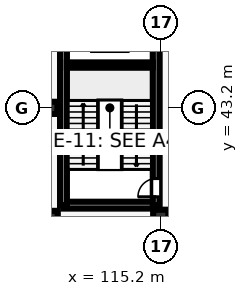
"""IFC4 building model, lengths in metres.
Left out: names, types, materials, properties, quantities, classifications, styles, units other than length and angle.
Written with IfcOpenShell. Run it as: python <this file> out.ifc"""

import sys

from ifc_helpers import new_model, si_unit, direction, frame, frame_2d, origin, origin_2d, place, context, subcontext, project, spatial, rectangle, circle, extrude, element, fill, save


model = new_model("IFC4")
c1 = context("Model", 3, precision=1e-05, world=origin(), true_north=direction((0.0, 1.0)))
c2 = subcontext(c1, "Body", "Model", "MODEL_VIEW")
j1 = project(units=[si_unit("LENGTHUNIT", "METRE"), si_unit("PLANEANGLEUNIT", "RADIAN")], contexts=[c1])
p1 = place(None, origin())
s1 = spatial("IfcSite", under=j1, at=p1, CompositionType="ELEMENT")
p2 = place(p1, origin())
s2 = spatial("IfcBuilding", under=s1, at=p2, CompositionType="ELEMENT")
p3 = place(p2, frame((0.0, 0.0, 5.4)))
s3 = spatial("IfcBuildingStorey", under=s2, at=p3, CompositionType="ELEMENT", Elevation=5.4)
p4 = place(p3, frame((108.0, 36.0, 0.0), z_axis=(0.0, 0.0, 1.0), x_axis=(1.0, 0.0, 0.0)))
e1 = element("IfcColumn", 1, at=p4, inside=s3, PredefinedType="COLUMN", context=c2, shape_type="SweptSolid", body=[
    extrude(rectangle(XDim=0.85, YDim=0.85, at=origin_2d()), origin(), (0.0, 0.0, 1.0), 4.2),
])
p5 = place(p3, frame((108.0, 43.2, 0.0), z_axis=(0.0, 0.0, 1.0), x_axis=(1.0, 0.0, 0.0)))
e2 = element("IfcColumn", 2, at=p5, inside=s3, PredefinedType="COLUMN", context=c2, shape_type="SweptSolid", body=[
    extrude(rectangle(XDim=0.8, YDim=0.8, at=origin_2d()), origin(), (0.0, 0.0, 1.0), 4.2),
])
p6 = place(p3, frame((115.2, 36.0, 0.0), z_axis=(0.0, 0.0, 1.0), x_axis=(1.0, 0.0, 0.0)))
e3 = element("IfcColumn", 3, at=p6, inside=s3, PredefinedType="COLUMN", context=c2, shape_type="SweptSolid", body=[
    extrude(circle(Radius=0.5, at=origin_2d()), origin(), (0.0, 0.0, 1.0), 4.2),
])
p7 = place(p3, frame((108.8, 36.8, 0.0), z_axis=(0.0, 0.0, 1.0), x_axis=(1.0, 0.0, 0.0)))
e4 = element("IfcWall", 4, at=p7, inside=s3, PredefinedType="SHEAR", context=c2, shape_type="SweptSolid", body=[
    extrude(rectangle(XDim=6.1, YDim=0.45, at=frame_2d((3.05, 0.0))), origin(), (0.0, 0.0, 1.0), 3.92),
])
p8 = place(p3, frame((108.8, 36.8, 0.0), z_axis=(0.0, 0.0, 1.0), x_axis=(0.0, 1.0, 0.0)))
e5 = element("IfcWall", 5, at=p8, inside=s3, PredefinedType="SHEAR", context=c2, shape_type="SweptSolid", body=[
    extrude(rectangle(XDim=12.8, YDim=0.45, at=frame_2d((6.4, 0.0))), origin(), (0.0, 0.0, 1.0), 3.92),
])
p9 = place(p3, frame((114.9, 36.8, 0.0), z_axis=(0.0, 0.0, 1.0), x_axis=(0.0, 1.0, 0.0)))
e6 = element("IfcWall", 6, at=p9, inside=s3, PredefinedType="SHEAR", context=c2, shape_type="SweptSolid", body=[
    extrude(rectangle(XDim=12.8, YDim=0.45, at=frame_2d((6.4, 0.0))), origin(), (0.0, 0.0, 1.0), 3.92),
])
p10 = place(p9, frame((0.55, 0.0, 0.0)))
e7 = element("IfcOpeningElement", 7, at=p10, cuts=e6, PredefinedType="OPENING", context=c2, shape_type="SweptSolid", body=[
    extrude(rectangle(XDim=1.2, YDim=2.25, at=frame_2d((0.6, 1.125))), frame((0.0, 0.235, 0.0), z_axis=(0.0, -1.0, 0.0), x_axis=(1.0, 0.0, 0.0)), (0.0, 0.0, 1.0), 0.47),
])
p11 = place(p9, frame((10.458, 0.0, 0.0)))
e8 = element("IfcOpeningElement", 8, at=p11, cuts=e6, PredefinedType="OPENING", context=c2, shape_type="SweptSolid", body=[
    extrude(rectangle(XDim=1.1, YDim=2.2, at=frame_2d((0.55, 1.1))), frame((0.0, 0.235, 0.0), z_axis=(0.0, -1.0, 0.0), x_axis=(1.0, 0.0, 0.0)), (0.0, 0.0, 1.0), 0.47),
])
p12 = place(p3, frame((109.025, 46.016, 0.0), z_axis=(0.0, 0.0, 1.0), x_axis=(1.0, 0.0, 0.0)))
e9 = element("IfcWall", 9, at=p12, inside=s3, PredefinedType="SHEAR", context=c2, shape_type="SweptSolid", body=[
    extrude(rectangle(XDim=5.65, YDim=0.35, at=frame_2d((2.825, 0.0))), origin(), (0.0, 0.0, 1.0), 3.92),
])
p13 = place(p10, origin())
e10 = element("IfcDoor", 10, at=p13, inside=s3, OperationType="SINGLE_SWING_LEFT", PredefinedType="DOOR", context=c2, shape_type="SweptSolid", body=[
    extrude(rectangle(XDim=1.2, YDim=2.25, at=frame_2d((0.6, 1.125))), frame((0.0, 0.025, 0.0), z_axis=(0.0, -1.0, 0.0), x_axis=(1.0, 0.0, 0.0)), (0.0, 0.0, 1.0), 0.05),
])
fill(e7, e10)
save(model, sys.argv[1])
